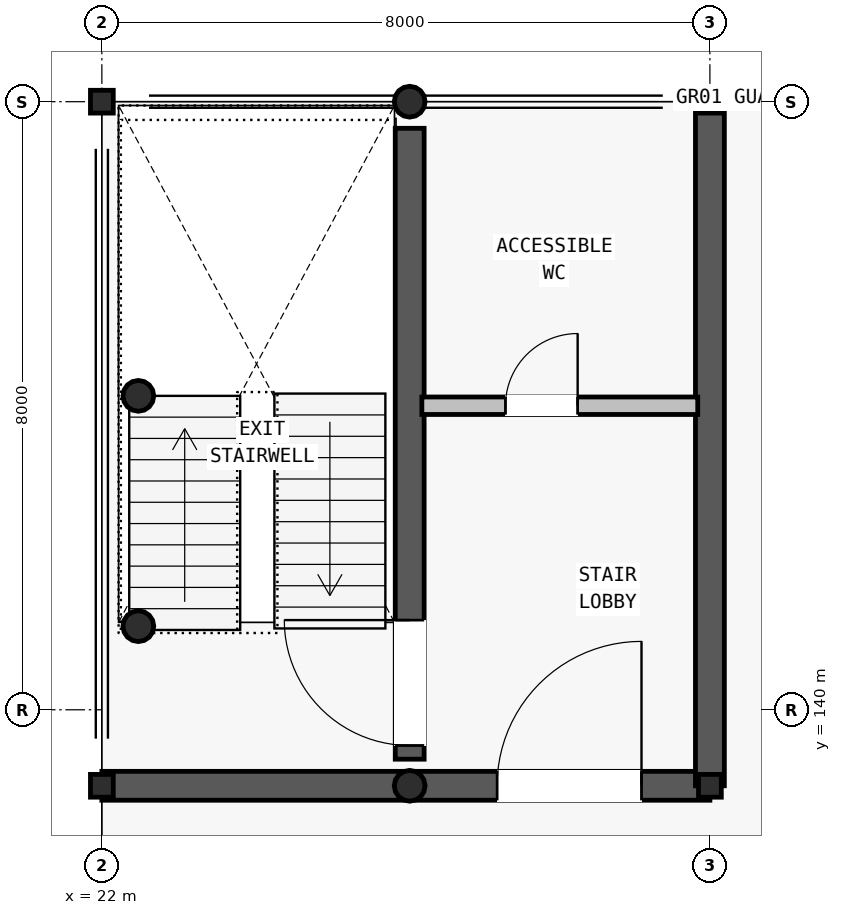
"""IFC4 building model, lengths in metres.
Left out: names, types, materials, properties, quantities, classifications, styles, units other than length and angle.
Written with IfcOpenShell. Run it as: python <this file> out.ifc"""

import sys

from ifc_helpers import new_model, si_unit, direction, frame, frame_2d, origin, origin_2d, place, context, subcontext, project, spatial, rectangle, hollow_circle, i_section, extrude, element, fill, save


model = new_model("IFC4")
c1 = context("Model", 3, precision=1e-05, world=origin(), true_north=direction((0.0, 1.0)))
c2 = subcontext(c1, "Body", "Model", "MODEL_VIEW")
j1 = project(units=[si_unit("LENGTHUNIT", "METRE"), si_unit("PLANEANGLEUNIT", "RADIAN")], contexts=[c1])
p1 = place(None, origin())
s1 = spatial("IfcSite", under=j1, at=p1, CompositionType="ELEMENT")
p2 = place(p1, origin())
s2 = spatial("IfcBuilding", under=s1, at=p2, CompositionType="ELEMENT")
p3 = place(p2, frame((0.0, 0.0, 5.6)))
s3 = spatial("IfcBuildingStorey", under=s2, at=p3, CompositionType="ELEMENT", Elevation=5.6)
for number, where, z_axis, x_axis in (
    (1, (22.0, 148.0, 0.0), (0.0, 0.0, 1.0), (1.0, 0.0, 0.0)),
    (2, (30.0, 148.0, 0.0), (0.0, 0.0, 1.0), (1.0, 0.0, 0.0)),
    (3, (22.0, 139.0, 0.0), (0.0, 0.0, 1.0), (1.0, 0.0, 0.0)),
    (4, (30.0, 139.0, 0.0), (0.0, 0.0, 1.0), (1.0, 0.0, 0.0)),
):
    element("IfcColumn", number, at=place(p3, frame(where, z_axis=z_axis, x_axis=x_axis)), inside=s3, PredefinedType="COLUMN", context=c2, shape_type="SweptSolid", body=[
        extrude(i_section(OverallWidth=0.3, OverallDepth=0.3, WebThickness=0.01, FlangeThickness=0.015, FilletRadius=0.018, at=origin_2d()), origin(), (0.0, 0.0, 1.0), 3.9),
    ])
for number, where, z_axis, x_axis in (
    (5, (26.05, 139.0, 0.0), (0.0, 0.0, 1.0), (1.0, 0.0, 0.0)),
    (6, (26.05, 148.0, 0.0), (0.0, 0.0, 1.0), (1.0, 0.0, 0.0)),
    (7, (22.48, 141.1, 0.0), (0.0, 0.0, 1.0), (1.0, 0.0, 0.0)),
    (8, (22.48, 144.13, 0.0), (0.0, 0.0, 1.0), (1.0, 0.0, 0.0)),
):
    element("IfcColumn", number, at=place(p3, frame(where, z_axis=z_axis, x_axis=x_axis)), inside=s3, PredefinedType="COLUMN", context=c2, shape_type="SweptSolid", body=[
        extrude(hollow_circle(Radius=0.203, WallThickness=0.014, at=origin_2d()), origin(), (0.0, 0.0, 1.0), 3.9),
    ])
p4 = place(p3, frame((22.0, 139.0, 0.0), z_axis=(0.0, 0.0, 1.0), x_axis=(1.0, 0.0, 0.0)))
e9 = element("IfcWall", 9, at=p4, inside=s3, PredefinedType="SHEAR", context=c2, shape_type="SweptSolid", body=[
    extrude(rectangle(XDim=8.0, YDim=0.38, at=frame_2d((4.0, 0.0))), origin(), (0.0, 0.0, 1.0), 3.62),
])
p5 = place(p4, frame((5.2, 0.0, 0.0)))
e10 = element("IfcOpeningElement", 10, at=p5, cuts=e9, PredefinedType="OPENING", context=c2, shape_type="SweptSolid", body=[
    extrude(rectangle(XDim=1.9, YDim=2.3, at=frame_2d((0.95, 1.15))), frame((0.0, 0.2, 0.0), z_axis=(0.0, -1.0, 0.0), x_axis=(1.0, 0.0, 0.0)), (0.0, 0.0, 1.0), 0.4),
])
p6 = place(p3, frame((30.0, 139.0, 0.0), z_axis=(0.0, 0.0, 1.0), x_axis=(0.0, 1.0, 0.0)))
e11 = element("IfcWall", 11, at=p6, inside=s3, PredefinedType="SHEAR", context=c2, shape_type="SweptSolid", body=[
    extrude(rectangle(XDim=9.0, YDim=0.38, at=frame_2d((4.5, 0.0))), origin(), (0.0, 0.0, 1.0), 3.62),
])
p7 = place(p3, frame((26.05, 139.35, 0.0), z_axis=(0.0, 0.0, 1.0), x_axis=(0.0, 1.0, 0.0)))
e12 = element("IfcWall", 12, at=p7, inside=s3, PredefinedType="SHEAR", context=c2, shape_type="SweptSolid", body=[
    extrude(rectangle(XDim=8.3, YDim=0.38, at=frame_2d((4.15, 0.0))), origin(), (0.0, 0.0, 1.0), 3.62),
])
p8 = place(p7, frame((0.18, 0.0, 0.0)))
e13 = element("IfcOpeningElement", 13, at=p8, cuts=e12, PredefinedType="OPENING", context=c2, shape_type="SweptSolid", body=[
    extrude(rectangle(XDim=1.65, YDim=2.2, at=frame_2d((0.825, 1.1))), frame((0.0, 0.2, 0.0), z_axis=(0.0, -1.0, 0.0), x_axis=(1.0, 0.0, 0.0)), (0.0, 0.0, 1.0), 0.4),
])
p9 = place(p3, frame((26.21, 144.0, 0.0), z_axis=(0.0, 0.0, 1.0), x_axis=(1.0, 0.0, 0.0)))
e14 = element("IfcWall", 14, at=p9, inside=s3, PredefinedType="PARTITIONING", context=c2, shape_type="SweptSolid", body=[
    extrude(rectangle(XDim=3.63, YDim=0.23, at=frame_2d((1.815, 0.0))), origin(), (0.0, 0.0, 1.0), 2.48),
])
p10 = place(p9, frame((1.1, 0.0, 0.0)))
e15 = element("IfcOpeningElement", 15, at=p10, cuts=e14, PredefinedType="OPENING", context=c2, shape_type="SweptSolid", body=[
    extrude(rectangle(XDim=0.95, YDim=2.1, at=frame_2d((0.475, 1.05))), frame((0.0, 0.125, 0.0), z_axis=(0.0, -1.0, 0.0), x_axis=(1.0, 0.0, 0.0)), (0.0, 0.0, 1.0), 0.25),
])
p11 = place(p5, origin())
e16 = element("IfcDoor", 16, at=p11, inside=s3, OperationType="SINGLE_SWING_RIGHT", PredefinedType="DOOR", context=c2, shape_type="SweptSolid", body=[
    extrude(rectangle(XDim=1.9, YDim=2.3, at=frame_2d((0.95, 1.15))), frame((0.0, 0.025, 0.0), z_axis=(0.0, -1.0, 0.0), x_axis=(1.0, 0.0, 0.0)), (0.0, 0.0, 1.0), 0.05),
])
fill(e10, e16)
p12 = place(p8, origin())
e17 = element("IfcDoor", 17, at=p12, inside=s3, OperationType="SINGLE_SWING_RIGHT", PredefinedType="DOOR", context=c2, shape_type="SweptSolid", body=[
    extrude(rectangle(XDim=1.65, YDim=2.2, at=frame_2d((0.825, 1.1))), frame((0.0, 0.025, 0.0), z_axis=(0.0, -1.0, 0.0), x_axis=(1.0, 0.0, 0.0)), (0.0, 0.0, 1.0), 0.05),
])
fill(e13, e17)
p13 = place(p10, origin())
e18 = element("IfcDoor", 18, at=p13, inside=s3, OperationType="SINGLE_SWING_RIGHT", PredefinedType="DOOR", context=c2, shape_type="SweptSolid", body=[
    extrude(rectangle(XDim=0.95, YDim=2.1, at=frame_2d((0.475, 1.05))), frame((0.0, 0.025, 0.0), z_axis=(0.0, -1.0, 0.0), x_axis=(1.0, 0.0, 0.0)), (0.0, 0.0, 1.0), 0.05),
])
fill(e15, e18)
save(model, sys.argv[1])
